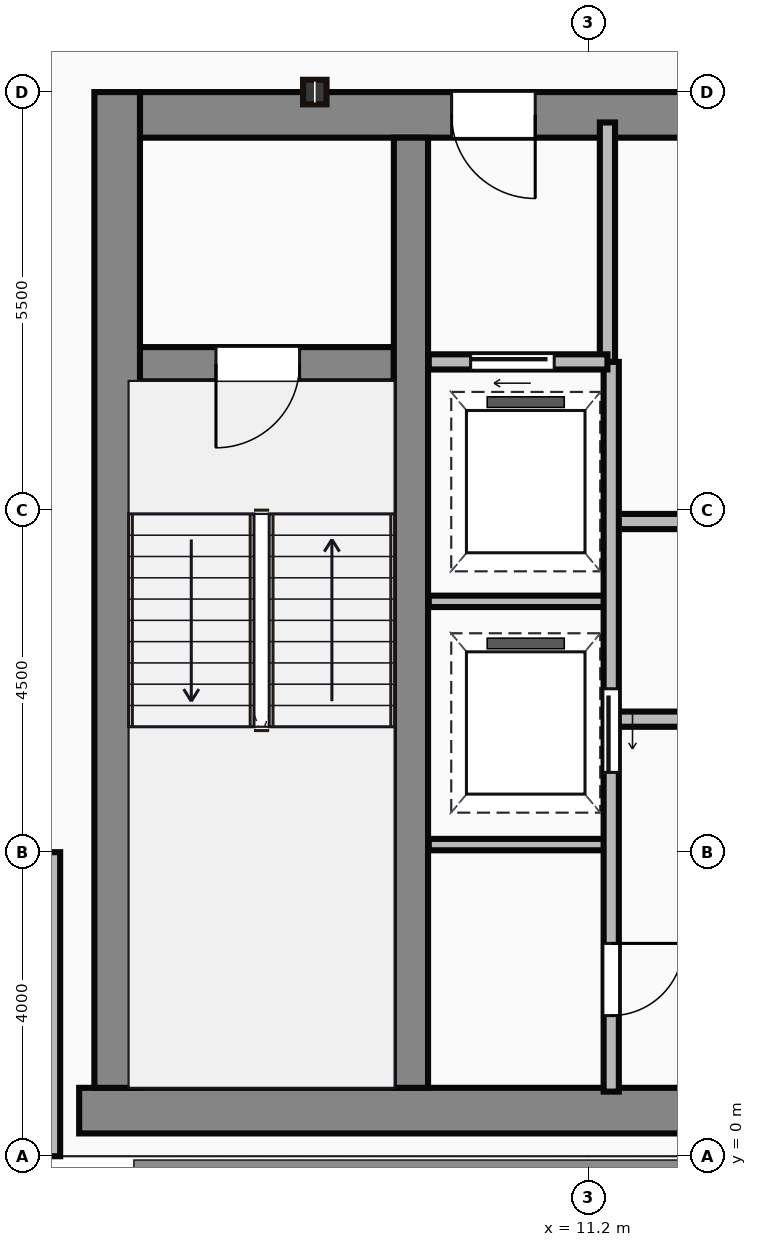
"""IFC4 building model, lengths in metres.
Left out: names, types, materials, properties, quantities, classifications, styles, units other than length and angle.
Written with IfcOpenShell. Run it as: python <this file> out.ifc"""

import sys

from ifc_helpers import new_model, si_unit, direction, frame, frame_2d, origin, origin_2d, place, context, subcontext, project, spatial, rectangle, i_section, extrude, source, transform, mapped, element, fill, save


model = new_model("IFC4")
c1 = context("Model", 3, precision=1e-05, world=origin(), true_north=direction((0.0, 1.0)))
c2 = subcontext(c1, "Body", "Model", "MODEL_VIEW")
j1 = project(units=[si_unit("LENGTHUNIT", "METRE"), si_unit("PLANEANGLEUNIT", "RADIAN")], contexts=[c1])
p1 = place(None, origin())
s1 = spatial("IfcSite", under=j1, at=p1, CompositionType="ELEMENT")
p2 = place(p1, origin())
s2 = spatial("IfcBuilding", under=s1, at=p2, CompositionType="ELEMENT")
p3 = place(p2, frame((0.0, 0.0, 296.05)))
s3 = spatial("IfcBuildingStorey", under=s2, at=p3, CompositionType="ELEMENT", Elevation=296.05)
m1 = source(origin(), c2, "Body", "SweptSolid", [
    extrude(rectangle(XDim=29.5, YDim=0.6, at=frame_2d((14.75, 0.0))), origin(), (0.0, 0.0, 1.0), 3.8),
])
p4 = place(p3, frame((4.5, 0.6, 0.0), z_axis=(0.0, 0.0, 1.0), x_axis=(1.0, 0.0, 0.0)))
e1 = element("IfcWall", 1, at=p4, inside=s3, PredefinedType="SHEAR", context=c2, shape_type="MappedRepresentation", body=[
    mapped(m1, transform((0.0, 0.0, 0.0))),
])
m2 = source(origin(), c2, "Body", "SweptSolid", [
    extrude(rectangle(XDim=13.1, YDim=0.6, at=frame_2d((6.55, 0.0))), origin(), (0.0, 0.0, 1.0), 3.8),
])
p5 = place(p3, frame((5.0, 0.9, 0.0), z_axis=(0.0, 0.0, 1.0), x_axis=(0.0, 1.0, 0.0)))
e2 = element("IfcWall", 2, at=p5, inside=s3, PredefinedType="SHEAR", context=c2, shape_type="MappedRepresentation", body=[
    mapped(m2, transform((0.0, 0.0, 0.0))),
])
m3 = source(origin(), c2, "Body", "SweptSolid", [
    extrude(rectangle(XDim=9.1, YDim=0.6, at=frame_2d((4.55, 0.0))), origin(), (0.0, 0.0, 1.0), 3.8),
])
p6 = place(p3, frame((5.3, 13.7, 0.0), z_axis=(0.0, 0.0, 1.0), x_axis=(1.0, 0.0, 0.0)))
e3 = element("IfcWall", 3, at=p6, inside=s3, PredefinedType="SHEAR", context=c2, shape_type="MappedRepresentation", body=[
    mapped(m3, transform((0.0, 0.0, 0.0))),
])
p7 = place(p6, frame((4.1, 0.0, 0.0)))
e4 = element("IfcOpeningElement", 4, at=p7, cuts=e3, PredefinedType="OPENING", context=c2, shape_type="SweptSolid", body=[
    extrude(rectangle(XDim=1.1, YDim=2.15, at=frame_2d((0.55, 1.075))), frame((0.0, 0.31, 0.0), z_axis=(0.0, -1.0, 0.0), x_axis=(1.0, 0.0, 0.0)), (0.0, 0.0, 1.0), 0.62),
])
m4 = source(origin(), c2, "Body", "SweptSolid", [
    extrude(rectangle(XDim=12.5, YDim=0.45, at=frame_2d((6.25, 0.0))), origin(), (0.0, 0.0, 1.0), 3.8),
])
p8 = place(p3, frame((8.865, 0.9, 0.0), z_axis=(0.0, 0.0, 1.0), x_axis=(0.0, 1.0, 0.0)))
e5 = element("IfcWall", 5, at=p8, inside=s3, PredefinedType="SHEAR", context=c2, shape_type="MappedRepresentation", body=[
    mapped(m4, transform((0.0, 0.0, 0.0))),
])
m5 = source(origin(), c2, "Body", "SweptSolid", [
    extrude(rectangle(XDim=3.39, YDim=0.45, at=frame_2d((1.695, 0.0))), origin(), (0.0, 0.0, 1.0), 3.8),
])
p9 = place(p3, frame((5.25, 10.42, 0.0), z_axis=(0.0, 0.0, 1.0), x_axis=(1.0, 0.0, 0.0)))
e6 = element("IfcWall", 6, at=p9, inside=s3, PredefinedType="SHEAR", context=c2, shape_type="MappedRepresentation", body=[
    mapped(m5, transform((0.0, 0.0, 0.0))),
])
p10 = place(p9, frame((1.05, 0.0, 0.0)))
e7 = element("IfcOpeningElement", 7, at=p10, cuts=e6, PredefinedType="OPENING", context=c2, shape_type="SweptSolid", body=[
    extrude(rectangle(XDim=1.1, YDim=2.15, at=frame_2d((0.55, 1.075))), frame((0.0, 0.235, 0.0), z_axis=(0.0, -1.0, 0.0), x_axis=(1.0, 0.0, 0.0)), (0.0, 0.0, 1.0), 0.47),
])
m6 = source(origin(), c2, "Body", "SweptSolid", [
    extrude(i_section(OverallWidth=0.309, OverallDepth=0.323, WebThickness=0.014, FlangeThickness=0.023, at=origin_2d()), origin(), (0.0, 0.0, 1.0), 3.8),
])
p11 = place(p3, frame((7.6, 14.0, 0.0), z_axis=(0.0, 0.0, 1.0), x_axis=(1.0, 0.0, 0.0)))
e8 = element("IfcColumn", 8, at=p11, inside=s3, PredefinedType="COLUMN", context=c2, shape_type="MappedRepresentation", body=[
    mapped(m6, transform((0.0, 0.0, 0.0))),
])
m7 = source(origin(), c2, "Body", "SweptSolid", [
    extrude(rectangle(XDim=4.0, YDim=0.25, at=frame_2d((2.0, 0.0))), origin(), (0.0, 0.0, 1.0), 3.5),
])
p12 = place(p3, frame((4.125, 4.0, 0.0), z_axis=(0.0, 0.0, 1.0), x_axis=(0.0, -1.0, 0.0)))
e9 = element("IfcWall", 9, at=p12, inside=s3, PredefinedType="STANDARD", context=c2, shape_type="MappedRepresentation", body=[
    mapped(m7, transform((0.0, 0.0, 0.0))),
])
m8 = source(origin(), c2, "Body", "SweptSolid", [
    extrude(rectangle(XDim=3.18, YDim=0.2, at=frame_2d((1.59, 0.0))), origin(), (0.0, 0.0, 1.0), 3.5),
])
p13 = place(p3, frame((11.45, 10.42, 0.0), z_axis=(0.0, 0.0, 1.0), x_axis=(0.0, 1.0, 0.0)))
e10 = element("IfcWall", 10, at=p13, inside=s3, PredefinedType="PARTITIONING", context=c2, shape_type="MappedRepresentation", body=[
    mapped(m8, transform((0.0, 0.0, 0.0))),
])
m9 = source(origin(), c2, "Body", "SweptSolid", [
    extrude(rectangle(XDim=2.35, YDim=0.2, at=frame_2d((1.175, 0.0))), origin(), (0.0, 0.0, 1.0), 3.5),
])
p14 = place(p3, frame((9.1, 10.45, 0.0), z_axis=(0.0, 0.0, 1.0), x_axis=(1.0, 0.0, 0.0)))
e11 = element("IfcWall", 11, at=p14, inside=s3, PredefinedType="PARTITIONING", context=c2, shape_type="MappedRepresentation", body=[
    mapped(m9, transform((0.0, 0.0, 0.0))),
])
p15 = place(p14, frame((0.55, 0.0, 0.0)))
e12 = element("IfcOpeningElement", 12, at=p15, cuts=e11, PredefinedType="OPENING", context=c2, shape_type="SweptSolid", body=[
    extrude(rectangle(XDim=1.1, YDim=2.15, at=frame_2d((0.55, 1.075))), frame((0.0, 0.11, 0.0), z_axis=(0.0, -1.0, 0.0), x_axis=(1.0, 0.0, 0.0)), (0.0, 0.0, 1.0), 0.22),
])
m10 = source(origin(), c2, "Body", "SweptSolid", [
    extrude(rectangle(XDim=9.6, YDim=0.2, at=frame_2d((4.8, 0.0))), origin(), (0.0, 0.0, 1.0), 3.5),
])
p16 = place(p3, frame((11.5, 0.85, 0.0), z_axis=(0.0, 0.0, 1.0), x_axis=(0.0, 1.0, 0.0)))
e13 = element("IfcWall", 13, at=p16, inside=s3, PredefinedType="PARTITIONING", context=c2, shape_type="MappedRepresentation", body=[
    mapped(m10, transform((0.0, 0.0, 0.0))),
])
p17 = place(p16, frame((4.2, 0.0, 0.0)))
e14 = element("IfcOpeningElement", 14, at=p17, cuts=e13, PredefinedType="OPENING", context=c2, shape_type="SweptSolid", body=[
    extrude(rectangle(XDim=1.1, YDim=2.15, at=frame_2d((0.55, 1.075))), frame((0.0, 0.11, 0.0), z_axis=(0.0, -1.0, 0.0), x_axis=(1.0, 0.0, 0.0)), (0.0, 0.0, 1.0), 0.22),
])
p18 = place(p16, frame((1.0, 0.0, 0.0)))
e15 = element("IfcOpeningElement", 15, at=p18, cuts=e13, PredefinedType="OPENING", context=c2, shape_type="SweptSolid", body=[
    extrude(rectangle(XDim=0.95, YDim=2.15, at=frame_2d((0.475, 1.075))), frame((0.0, 0.11, 0.0), z_axis=(0.0, -1.0, 0.0), x_axis=(1.0, 0.0, 0.0)), (0.0, 0.0, 1.0), 0.22),
])
m11 = source(origin(), c2, "Body", "SweptSolid", [
    extrude(rectangle(XDim=2.4, YDim=0.15, at=frame_2d((1.2, 0.0))), origin(), (0.0, 0.0, 1.0), 3.5),
])
for number, where, z_axis, x_axis in (
    (16, (9.1, 4.1, 0.0), (0.0, 0.0, 1.0), (1.0, 0.0, 0.0)),
    (17, (9.1, 7.3, 0.0), (0.0, 0.0, 1.0), (1.0, 0.0, 0.0)),
):
    element("IfcWall", number, at=place(p3, frame(where, z_axis=z_axis, x_axis=x_axis)), inside=s3, PredefinedType="PARTITIONING", context=c2, shape_type="MappedRepresentation", body=[
        mapped(m11, transform((0.0, 0.0, 0.0))),
    ])
m12 = source(origin(), c2, "Body", "SweptSolid", [
    extrude(rectangle(XDim=11.85, YDim=0.2, at=frame_2d((5.925, 0.0))), origin(), (0.0, 0.0, 1.0), 3.5),
])
p19 = place(p3, frame((11.55, 5.75, 0.0), z_axis=(0.0, 0.0, 1.0), x_axis=(1.0, 0.0, 0.0)))
e18 = element("IfcWall", 18, at=p19, inside=s3, PredefinedType="PARTITIONING", context=c2, shape_type="MappedRepresentation", body=[
    mapped(m12, transform((0.0, 0.0, 0.0))),
])
p20 = place(p19, frame((5.2, 0.0, 0.0)))
e19 = element("IfcOpeningElement", 19, at=p20, cuts=e18, PredefinedType="OPENING", context=c2, shape_type="SweptSolid", body=[
    extrude(rectangle(XDim=1.1, YDim=2.15, at=frame_2d((0.55, 1.075))), frame((0.0, 0.11, 0.0), z_axis=(0.0, -1.0, 0.0), x_axis=(1.0, 0.0, 0.0)), (0.0, 0.0, 1.0), 0.22),
])
p21 = place(p3, frame((11.55, 8.35, 0.0), z_axis=(0.0, 0.0, 1.0), x_axis=(1.0, 0.0, 0.0)))
e20 = element("IfcWall", 20, at=p21, inside=s3, PredefinedType="PARTITIONING", context=c2, shape_type="MappedRepresentation", body=[
    mapped(m12, transform((0.0, 0.0, 0.0))),
])
m13 = source(origin(), c2, "Body", "SweptSolid", [
    extrude(rectangle(XDim=1.1, YDim=2.15, at=frame_2d((0.55, 1.075))), frame((0.0, 0.025, 0.0), z_axis=(0.0, -1.0, 0.0), x_axis=(1.0, 0.0, 0.0)), (0.0, 0.0, 1.0), 0.05),
])
p22 = place(p10, frame((1.1, 0.0, 0.0), z_axis=(0.0, 0.0, 1.0), x_axis=(-1.0, 0.0, 0.0)))
e21 = element("IfcDoor", 21, at=p22, inside=s3, OperationType="SINGLE_SWING_LEFT", PredefinedType="DOOR", context=c2, shape_type="MappedRepresentation", body=[
    mapped(m13, transform((0.0, 0.0, 0.0))),
])
fill(e7, e21)
p23 = place(p7, origin())
e22 = element("IfcDoor", 22, at=p23, inside=s3, OperationType="SINGLE_SWING_RIGHT", PredefinedType="DOOR", context=c2, shape_type="MappedRepresentation", body=[
    mapped(m13, transform((0.0, 0.0, 0.0))),
])
fill(e4, e22)
p24 = place(p15, origin())
e23 = element("IfcDoor", 23, at=p24, inside=s3, OperationType="SLIDING_TO_LEFT", PredefinedType="DOOR", context=c2, shape_type="MappedRepresentation", body=[
    mapped(m13, transform((0.0, 0.0, 0.0))),
])
fill(e12, e23)
p25 = place(p17, frame((1.1, 0.0, 0.0), z_axis=(0.0, 0.0, 1.0), x_axis=(-1.0, 0.0, 0.0)))
e24 = element("IfcDoor", 24, at=p25, inside=s3, OperationType="SLIDING_TO_LEFT", PredefinedType="DOOR", context=c2, shape_type="MappedRepresentation", body=[
    mapped(m13, transform((0.0, 0.0, 0.0))),
])
fill(e14, e24)
m14 = source(origin(), c2, "Body", "SweptSolid", [
    extrude(rectangle(XDim=0.95, YDim=2.15, at=frame_2d((0.475, 1.075))), frame((0.0, 0.025, 0.0), z_axis=(0.0, -1.0, 0.0), x_axis=(1.0, 0.0, 0.0)), (0.0, 0.0, 1.0), 0.05),
])
p26 = place(p18, frame((0.95, 0.0, 0.0), z_axis=(0.0, 0.0, 1.0), x_axis=(-1.0, 0.0, 0.0)))
e25 = element("IfcDoor", 25, at=p26, inside=s3, OperationType="SINGLE_SWING_RIGHT", PredefinedType="DOOR", context=c2, shape_type="MappedRepresentation", body=[
    mapped(m14, transform((0.0, 0.0, 0.0))),
])
fill(e15, e25)
save(model, sys.argv[1])
